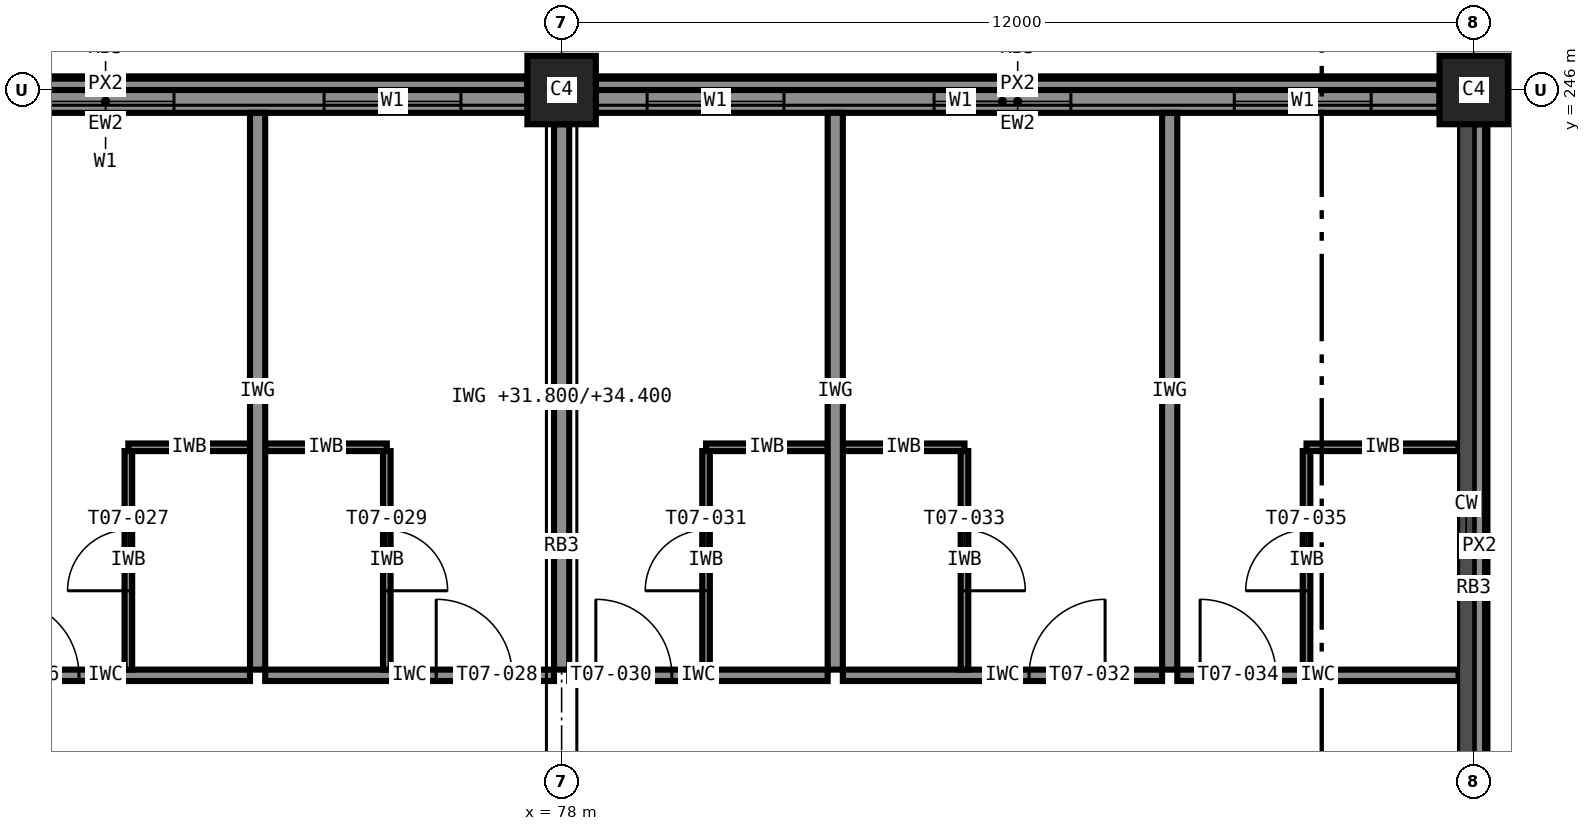
"""IFC4 building model, lengths in metres.
Left out: names, types, materials, properties, quantities, classifications, styles, units other than length and angle.
Written with IfcOpenShell. Run it as: python <this file> out.ifc"""

import sys

from ifc_helpers import new_model, si_unit, direction, frame, frame_2d, origin, origin_2d, place, context, subcontext, project, spatial, rectangle, extrude, element, fill, save


model = new_model("IFC4")
c1 = context("Model", 3, precision=1e-05, world=origin(), true_north=direction((0.0, 1.0)))
c2 = subcontext(c1, "Body", "Model", "MODEL_VIEW")
j1 = project(units=[si_unit("LENGTHUNIT", "METRE"), si_unit("PLANEANGLEUNIT", "RADIAN")], contexts=[c1])
p1 = place(None, origin())
s1 = spatial("IfcSite", under=j1, at=p1, CompositionType="ELEMENT")
p2 = place(p1, origin())
s2 = spatial("IfcBuilding", under=s1, at=p2, CompositionType="ELEMENT")
p3 = place(p2, frame((0.0, 0.0, 31.8)))
s3 = spatial("IfcBuildingStorey", under=s2, at=p3, CompositionType="ELEMENT", Elevation=31.8)
for number, where, z_axis, x_axis in (
    (1, (78.0, 246.0, 0.0), (0.0, 0.0, 1.0), (1.0, 0.0, 0.0)),
    (2, (90.0, 246.0, 0.0), (0.0, 0.0, 1.0), (1.0, 0.0, 0.0)),
):
    element("IfcColumn", number, at=place(p3, frame(where, z_axis=z_axis, x_axis=x_axis)), inside=s3, PredefinedType="COLUMN", context=c2, shape_type="SweptSolid", body=[
        extrude(rectangle(XDim=0.9, YDim=0.9, at=origin_2d()), origin(), (0.0, 0.0, 1.0), 3.6),
    ])
p4 = place(p3, frame((90.075, 234.45, 3.4), z_axis=(0.0, 0.0, 1.0), x_axis=(0.0, 1.0, 0.0)))
e3 = element("IfcWall", 3, at=p4, inside=s3, PredefinedType="STANDARD", context=c2, shape_type="SweptSolid", body=[
    extrude(rectangle(XDim=11.1, YDim=0.15, at=frame_2d((5.55, 0.0))), origin(), (0.0, 0.0, 1.0), 0.2),
])
p5 = place(p3, frame((89.55, 245.85, 0.0), z_axis=(0.0, 0.0, 1.0), x_axis=(-1.0, 0.0, 0.0)))
e4 = element("IfcWall", 4, at=p5, inside=s3, PredefinedType="STANDARD", context=c2, shape_type="SweptSolid", body=[
    extrude(rectangle(XDim=11.1, YDim=0.3, at=frame_2d((5.55, 0.0))), origin(), (0.0, 0.0, 1.0), 2.6),
])
p6 = place(p5, frame((8.625, 0.0, 0.85)))
e5 = element("IfcOpeningElement", 5, at=p6, cuts=e4, PredefinedType="OPENING", context=c2, shape_type="SweptSolid", body=[
    extrude(rectangle(XDim=1.8, YDim=1.75, at=frame_2d((0.9, 0.875))), frame((0.0, 0.16, 0.0), z_axis=(0.0, -1.0, 0.0), x_axis=(1.0, 0.0, 0.0)), (0.0, 0.0, 1.0), 0.32),
])
p7 = place(p5, frame((4.85, 0.0, 0.85)))
e6 = element("IfcOpeningElement", 6, at=p7, cuts=e4, PredefinedType="OPENING", context=c2, shape_type="SweptSolid", body=[
    extrude(rectangle(XDim=1.8, YDim=1.75, at=frame_2d((0.9, 0.875))), frame((0.0, 0.16, 0.0), z_axis=(0.0, -1.0, 0.0), x_axis=(1.0, 0.0, 0.0)), (0.0, 0.0, 1.0), 0.32),
])
p8 = place(p5, frame((0.9, 0.0, 0.85)))
e7 = element("IfcOpeningElement", 7, at=p8, cuts=e4, PredefinedType="OPENING", context=c2, shape_type="SweptSolid", body=[
    extrude(rectangle(XDim=1.8, YDim=1.75, at=frame_2d((0.9, 0.875))), frame((0.0, 0.16, 0.0), z_axis=(0.0, -1.0, 0.0), x_axis=(1.0, 0.0, 0.0)), (0.0, 0.0, 1.0), 0.32),
])
p9 = place(p3, frame((77.55, 245.85, 0.0), z_axis=(0.0, 0.0, 1.0), x_axis=(-1.0, 0.0, 0.0)))
e8 = element("IfcWall", 8, at=p9, inside=s3, PredefinedType="STANDARD", context=c2, shape_type="SweptSolid", body=[
    extrude(rectangle(XDim=11.1, YDim=0.3, at=frame_2d((5.55, 0.0))), origin(), (0.0, 0.0, 1.0), 2.6),
])
p10 = place(p9, frame((8.425, 0.0, 0.85)))
e9 = element("IfcOpeningElement", 9, at=p10, cuts=e8, PredefinedType="OPENING", context=c2, shape_type="SweptSolid", body=[
    extrude(rectangle(XDim=1.8, YDim=1.75, at=frame_2d((0.9, 0.875))), frame((0.0, 0.16, 0.0), z_axis=(0.0, -1.0, 0.0), x_axis=(1.0, 0.0, 0.0)), (0.0, 0.0, 1.0), 0.32),
])
p11 = place(p9, frame((4.65, 0.0, 0.85)))
e10 = element("IfcOpeningElement", 10, at=p11, cuts=e8, PredefinedType="OPENING", context=c2, shape_type="SweptSolid", body=[
    extrude(rectangle(XDim=1.8, YDim=1.75, at=frame_2d((0.9, 0.875))), frame((0.0, 0.16, 0.0), z_axis=(0.0, -1.0, 0.0), x_axis=(1.0, 0.0, 0.0)), (0.0, 0.0, 1.0), 0.32),
])
p12 = place(p9, frame((0.875, 0.0, 0.85)))
e11 = element("IfcOpeningElement", 11, at=p12, cuts=e8, PredefinedType="OPENING", context=c2, shape_type="SweptSolid", body=[
    extrude(rectangle(XDim=1.8, YDim=1.75, at=frame_2d((0.9, 0.875))), frame((0.0, 0.16, 0.0), z_axis=(0.0, -1.0, 0.0), x_axis=(1.0, 0.0, 0.0)), (0.0, 0.0, 1.0), 0.32),
])
for number, where, z_axis, x_axis in (
    (12, (89.55, 246.075, 3.4), (0.0, 0.0, 1.0), (-1.0, 0.0, 0.0)),
    (13, (77.55, 246.075, 3.4), (0.0, 0.0, 1.0), (-1.0, 0.0, 0.0)),
):
    element("IfcWall", number, at=place(p3, frame(where, z_axis=z_axis, x_axis=x_axis)), inside=s3, PredefinedType="STANDARD", context=c2, shape_type="SweptSolid", body=[
        extrude(rectangle(XDim=11.1, YDim=0.15, at=frame_2d((5.55, 0.0))), origin(), (0.0, 0.0, 1.0), 0.2),
    ])
p13 = place(p3, frame((70.1, 238.3, 0.0), z_axis=(0.0, 0.0, 1.0), x_axis=(1.0, 0.0, 0.0)))
e14 = element("IfcWall", 14, at=p13, inside=s3, PredefinedType="PARTITIONING", context=c2, shape_type="SweptSolid", body=[
    extrude(rectangle(XDim=3.8, YDim=0.15, at=frame_2d((1.9, 0.0))), origin(), (0.0, 0.0, 1.0), 3.4),
])
p14 = place(p13, frame((0.55, 0.0, 0.0)))
e15 = element("IfcOpeningElement", 15, at=p14, cuts=e14, PredefinedType="OPENING", context=c2, shape_type="SweptSolid", body=[
    extrude(rectangle(XDim=1.0, YDim=2.1, at=frame_2d((0.5, 1.05))), frame((0.0, 0.085, 0.0), z_axis=(0.0, -1.0, 0.0), x_axis=(1.0, 0.0, 0.0)), (0.0, 0.0, 1.0), 0.17),
])
p15 = place(p3, frame((72.3, 241.3, 0.0), z_axis=(0.0, 0.0, 1.0), x_axis=(1.0, 0.0, 0.0)))
e16 = element("IfcWall", 16, at=p15, inside=s3, PredefinedType="PARTITIONING", context=c2, shape_type="SweptSolid", body=[
    extrude(rectangle(XDim=1.6, YDim=0.1, at=frame_2d((0.8, 0.0))), origin(), (0.0, 0.0, 1.0), 3.4),
])
p16 = place(p3, frame((72.3, 238.375, 0.0), z_axis=(0.0, 0.0, 1.0), x_axis=(0.0, 1.0, 0.0)))
e17 = element("IfcWall", 17, at=p16, inside=s3, PredefinedType="PARTITIONING", context=c2, shape_type="SweptSolid", body=[
    extrude(rectangle(XDim=2.875, YDim=0.1, at=frame_2d((1.438, 0.0))), origin(), (0.0, 0.0, 1.0), 3.4),
])
p17 = place(p16, frame((1.038, 0.0, 0.0)))
e18 = element("IfcOpeningElement", 18, at=p17, cuts=e17, PredefinedType="OPENING", context=c2, shape_type="SweptSolid", body=[
    extrude(rectangle(XDim=0.8, YDim=2.1, at=frame_2d((0.4, 1.05))), frame((0.0, 0.06, 0.0), z_axis=(0.0, -1.0, 0.0), x_axis=(1.0, 0.0, 0.0)), (0.0, 0.0, 1.0), 0.12),
])
p18 = place(p3, frame((74.1, 238.3, 0.0), z_axis=(0.0, 0.0, 1.0), x_axis=(1.0, 0.0, 0.0)))
e19 = element("IfcWall", 19, at=p18, inside=s3, PredefinedType="PARTITIONING", context=c2, shape_type="SweptSolid", body=[
    extrude(rectangle(XDim=3.8, YDim=0.15, at=frame_2d((1.9, 0.0))), origin(), (0.0, 0.0, 1.0), 3.4),
])
p19 = place(p18, frame((2.25, 0.0, 0.0)))
e20 = element("IfcOpeningElement", 20, at=p19, cuts=e19, PredefinedType="OPENING", context=c2, shape_type="SweptSolid", body=[
    extrude(rectangle(XDim=1.0, YDim=2.1, at=frame_2d((0.5, 1.05))), frame((0.0, 0.085, 0.0), z_axis=(0.0, -1.0, 0.0), x_axis=(1.0, 0.0, 0.0)), (0.0, 0.0, 1.0), 0.17),
])
p20 = place(p3, frame((74.1, 241.3, 0.0), z_axis=(0.0, 0.0, 1.0), x_axis=(1.0, 0.0, 0.0)))
e21 = element("IfcWall", 21, at=p20, inside=s3, PredefinedType="PARTITIONING", context=c2, shape_type="SweptSolid", body=[
    extrude(rectangle(XDim=1.6, YDim=0.1, at=frame_2d((0.8, 0.0))), origin(), (0.0, 0.0, 1.0), 3.4),
])
p21 = place(p3, frame((75.7, 241.25, 0.0), z_axis=(0.0, 0.0, 1.0), x_axis=(0.0, -1.0, 0.0)))
e22 = element("IfcWall", 22, at=p21, inside=s3, PredefinedType="PARTITIONING", context=c2, shape_type="SweptSolid", body=[
    extrude(rectangle(XDim=2.875, YDim=0.1, at=frame_2d((1.438, 0.0))), origin(), (0.0, 0.0, 1.0), 3.4),
])
p22 = place(p21, frame((1.038, 0.0, 0.0)))
e23 = element("IfcOpeningElement", 23, at=p22, cuts=e22, PredefinedType="OPENING", context=c2, shape_type="SweptSolid", body=[
    extrude(rectangle(XDim=0.8, YDim=2.1, at=frame_2d((0.4, 1.05))), frame((0.0, 0.06, 0.0), z_axis=(0.0, -1.0, 0.0), x_axis=(1.0, 0.0, 0.0)), (0.0, 0.0, 1.0), 0.12),
])
p23 = place(p3, frame((78.1, 238.3, 0.0), z_axis=(0.0, 0.0, 1.0), x_axis=(1.0, 0.0, 0.0)))
e24 = element("IfcWall", 24, at=p23, inside=s3, PredefinedType="PARTITIONING", context=c2, shape_type="SweptSolid", body=[
    extrude(rectangle(XDim=3.4, YDim=0.15, at=frame_2d((1.7, 0.0))), origin(), (0.0, 0.0, 1.0), 3.4),
])
p24 = place(p23, frame((0.35, 0.0, 0.0)))
e25 = element("IfcOpeningElement", 25, at=p24, cuts=e24, PredefinedType="OPENING", context=c2, shape_type="SweptSolid", body=[
    extrude(rectangle(XDim=1.0, YDim=2.1, at=frame_2d((0.5, 1.05))), frame((0.0, 0.085, 0.0), z_axis=(0.0, -1.0, 0.0), x_axis=(1.0, 0.0, 0.0)), (0.0, 0.0, 1.0), 0.17),
])
p25 = place(p3, frame((79.9, 241.3, 0.0), z_axis=(0.0, 0.0, 1.0), x_axis=(1.0, 0.0, 0.0)))
e26 = element("IfcWall", 26, at=p25, inside=s3, PredefinedType="PARTITIONING", context=c2, shape_type="SweptSolid", body=[
    extrude(rectangle(XDim=1.6, YDim=0.1, at=frame_2d((0.8, 0.0))), origin(), (0.0, 0.0, 1.0), 3.4),
])
p26 = place(p3, frame((79.9, 238.375, 0.0), z_axis=(0.0, 0.0, 1.0), x_axis=(0.0, 1.0, 0.0)))
e27 = element("IfcWall", 27, at=p26, inside=s3, PredefinedType="PARTITIONING", context=c2, shape_type="SweptSolid", body=[
    extrude(rectangle(XDim=2.875, YDim=0.1, at=frame_2d((1.438, 0.0))), origin(), (0.0, 0.0, 1.0), 3.4),
])
p27 = place(p26, frame((1.038, 0.0, 0.0)))
e28 = element("IfcOpeningElement", 28, at=p27, cuts=e27, PredefinedType="OPENING", context=c2, shape_type="SweptSolid", body=[
    extrude(rectangle(XDim=0.8, YDim=2.1, at=frame_2d((0.4, 1.05))), frame((0.0, 0.06, 0.0), z_axis=(0.0, -1.0, 0.0), x_axis=(1.0, 0.0, 0.0)), (0.0, 0.0, 1.0), 0.12),
])
p28 = place(p3, frame((81.7, 238.3, 0.0), z_axis=(0.0, 0.0, 1.0), x_axis=(1.0, 0.0, 0.0)))
e29 = element("IfcWall", 29, at=p28, inside=s3, PredefinedType="PARTITIONING", context=c2, shape_type="SweptSolid", body=[
    extrude(rectangle(XDim=4.2, YDim=0.15, at=frame_2d((2.1, 0.0))), origin(), (0.0, 0.0, 1.0), 3.4),
])
p29 = place(p28, frame((2.45, 0.0, 0.0)))
e30 = element("IfcOpeningElement", 30, at=p29, cuts=e29, PredefinedType="OPENING", context=c2, shape_type="SweptSolid", body=[
    extrude(rectangle(XDim=1.0, YDim=2.1, at=frame_2d((0.5, 1.05))), frame((0.0, 0.085, 0.0), z_axis=(0.0, -1.0, 0.0), x_axis=(1.0, 0.0, 0.0)), (0.0, 0.0, 1.0), 0.17),
])
p30 = place(p3, frame((81.7, 241.3, 0.0), z_axis=(0.0, 0.0, 1.0), x_axis=(1.0, 0.0, 0.0)))
e31 = element("IfcWall", 31, at=p30, inside=s3, PredefinedType="PARTITIONING", context=c2, shape_type="SweptSolid", body=[
    extrude(rectangle(XDim=1.6, YDim=0.1, at=frame_2d((0.8, 0.0))), origin(), (0.0, 0.0, 1.0), 3.4),
])
p31 = place(p3, frame((83.3, 241.25, 0.0), z_axis=(0.0, 0.0, 1.0), x_axis=(0.0, -1.0, 0.0)))
e32 = element("IfcWall", 32, at=p31, inside=s3, PredefinedType="PARTITIONING", context=c2, shape_type="SweptSolid", body=[
    extrude(rectangle(XDim=2.875, YDim=0.1, at=frame_2d((1.438, 0.0))), origin(), (0.0, 0.0, 1.0), 3.4),
])
p32 = place(p31, frame((1.038, 0.0, 0.0)))
e33 = element("IfcOpeningElement", 33, at=p32, cuts=e32, PredefinedType="OPENING", context=c2, shape_type="SweptSolid", body=[
    extrude(rectangle(XDim=0.8, YDim=2.1, at=frame_2d((0.4, 1.05))), frame((0.0, 0.06, 0.0), z_axis=(0.0, -1.0, 0.0), x_axis=(1.0, 0.0, 0.0)), (0.0, 0.0, 1.0), 0.12),
])
p33 = place(p3, frame((86.1, 238.3, 0.0), z_axis=(0.0, 0.0, 1.0), x_axis=(1.0, 0.0, 0.0)))
e34 = element("IfcWall", 34, at=p33, inside=s3, PredefinedType="PARTITIONING", context=c2, shape_type="SweptSolid", body=[
    extrude(rectangle(XDim=3.7, YDim=0.15, at=frame_2d((1.85, 0.0))), origin(), (0.0, 0.0, 1.0), 3.4),
])
p34 = place(p33, frame((0.3, 0.0, 0.0)))
e35 = element("IfcOpeningElement", 35, at=p34, cuts=e34, PredefinedType="OPENING", context=c2, shape_type="SweptSolid", body=[
    extrude(rectangle(XDim=1.0, YDim=2.1, at=frame_2d((0.5, 1.05))), frame((0.0, 0.085, 0.0), z_axis=(0.0, -1.0, 0.0), x_axis=(1.0, 0.0, 0.0)), (0.0, 0.0, 1.0), 0.17),
])
p35 = place(p3, frame((87.8, 241.3, 0.0), z_axis=(0.0, 0.0, 1.0), x_axis=(1.0, 0.0, 0.0)))
e36 = element("IfcWall", 36, at=p35, inside=s3, PredefinedType="PARTITIONING", context=c2, shape_type="SweptSolid", body=[
    extrude(rectangle(XDim=2.0, YDim=0.1, at=frame_2d((1.0, 0.0))), origin(), (0.0, 0.0, 1.0), 3.4),
])
p36 = place(p3, frame((87.8, 238.375, 0.0), z_axis=(0.0, 0.0, 1.0), x_axis=(0.0, 1.0, 0.0)))
e37 = element("IfcWall", 37, at=p36, inside=s3, PredefinedType="PARTITIONING", context=c2, shape_type="SweptSolid", body=[
    extrude(rectangle(XDim=2.875, YDim=0.1, at=frame_2d((1.438, 0.0))), origin(), (0.0, 0.0, 1.0), 3.4),
])
p37 = place(p36, frame((1.038, 0.0, 0.0)))
e38 = element("IfcOpeningElement", 38, at=p37, cuts=e37, PredefinedType="OPENING", context=c2, shape_type="SweptSolid", body=[
    extrude(rectangle(XDim=0.8, YDim=2.1, at=frame_2d((0.4, 1.05))), frame((0.0, 0.06, 0.0), z_axis=(0.0, -1.0, 0.0), x_axis=(1.0, 0.0, 0.0)), (0.0, 0.0, 1.0), 0.12),
])
p38 = place(p3, frame((74.0, 245.7, 0.0), z_axis=(0.0, 0.0, 1.0), x_axis=(0.0, -1.0, 0.0)))
e39 = element("IfcWall", 39, at=p38, inside=s3, PredefinedType="PARTITIONING", context=c2, shape_type="SweptSolid", body=[
    extrude(rectangle(XDim=7.325, YDim=0.2, at=frame_2d((3.663, 0.0))), origin(), (0.0, 0.0, 1.0), 3.4),
])
p39 = place(p3, frame((78.0, 245.55, 0.0), z_axis=(0.0, 0.0, 1.0), x_axis=(0.0, -1.0, 0.0)))
e40 = element("IfcWall", 40, at=p39, inside=s3, PredefinedType="PARTITIONING", context=c2, shape_type="SweptSolid", body=[
    extrude(rectangle(XDim=7.175, YDim=0.2, at=frame_2d((3.587, 0.0))), origin(), (0.0, 0.0, 1.0), 2.6),
])
for number, where, z_axis, x_axis in (
    (41, (81.6, 245.7, 0.0), (0.0, 0.0, 1.0), (0.0, -1.0, 0.0)),
    (42, (86.0, 245.7, 0.0), (0.0, 0.0, 1.0), (0.0, -1.0, 0.0)),
):
    element("IfcWall", number, at=place(p3, frame(where, z_axis=z_axis, x_axis=x_axis)), inside=s3, PredefinedType="PARTITIONING", context=c2, shape_type="SweptSolid", body=[
        extrude(rectangle(XDim=7.325, YDim=0.2, at=frame_2d((3.663, 0.0))), origin(), (0.0, 0.0, 1.0), 3.4),
    ])
p40 = place(p6, origin())
e43 = element("IfcWindow", 43, at=p40, inside=s3, PartitioningType="SINGLE_PANEL", PredefinedType="WINDOW", context=c2, shape_type="SweptSolid", body=[
    extrude(rectangle(XDim=1.8, YDim=1.75, at=frame_2d((0.9, 0.875))), frame((0.0, 0.03, 0.0), z_axis=(0.0, -1.0, 0.0), x_axis=(1.0, 0.0, 0.0)), (0.0, 0.0, 1.0), 0.06),
])
fill(e5, e43)
p41 = place(p7, origin())
e44 = element("IfcWindow", 44, at=p41, inside=s3, PartitioningType="SINGLE_PANEL", PredefinedType="WINDOW", context=c2, shape_type="SweptSolid", body=[
    extrude(rectangle(XDim=1.8, YDim=1.75, at=frame_2d((0.9, 0.875))), frame((0.0, 0.03, 0.0), z_axis=(0.0, -1.0, 0.0), x_axis=(1.0, 0.0, 0.0)), (0.0, 0.0, 1.0), 0.06),
])
fill(e6, e44)
p42 = place(p8, origin())
e45 = element("IfcWindow", 45, at=p42, inside=s3, PartitioningType="SINGLE_PANEL", PredefinedType="WINDOW", context=c2, shape_type="SweptSolid", body=[
    extrude(rectangle(XDim=1.8, YDim=1.75, at=frame_2d((0.9, 0.875))), frame((0.0, 0.03, 0.0), z_axis=(0.0, -1.0, 0.0), x_axis=(1.0, 0.0, 0.0)), (0.0, 0.0, 1.0), 0.06),
])
fill(e7, e45)
p43 = place(p11, origin())
e46 = element("IfcWindow", 46, at=p43, inside=s3, PartitioningType="SINGLE_PANEL", PredefinedType="WINDOW", context=c2, shape_type="SweptSolid", body=[
    extrude(rectangle(XDim=1.8, YDim=1.75, at=frame_2d((0.9, 0.875))), frame((0.0, 0.03, 0.0), z_axis=(0.0, -1.0, 0.0), x_axis=(1.0, 0.0, 0.0)), (0.0, 0.0, 1.0), 0.06),
])
fill(e10, e46)
p44 = place(p12, origin())
e47 = element("IfcWindow", 47, at=p44, inside=s3, PartitioningType="SINGLE_PANEL", PredefinedType="WINDOW", context=c2, shape_type="SweptSolid", body=[
    extrude(rectangle(XDim=1.8, YDim=1.75, at=frame_2d((0.9, 0.875))), frame((0.0, 0.03, 0.0), z_axis=(0.0, -1.0, 0.0), x_axis=(1.0, 0.0, 0.0)), (0.0, 0.0, 1.0), 0.06),
])
fill(e11, e47)
p45 = place(p14, origin())
e48 = element("IfcDoor", 48, at=p45, inside=s3, OperationType="SINGLE_SWING_LEFT", PredefinedType="DOOR", context=c2, shape_type="SweptSolid", body=[
    extrude(rectangle(XDim=1.0, YDim=2.1, at=frame_2d((0.5, 1.05))), frame((0.0, 0.025, 0.0), z_axis=(0.0, -1.0, 0.0), x_axis=(1.0, 0.0, 0.0)), (0.0, 0.0, 1.0), 0.05),
])
fill(e15, e48)
p46 = place(p17, origin())
e49 = element("IfcDoor", 49, at=p46, inside=s3, OperationType="SINGLE_SWING_LEFT", PredefinedType="DOOR", context=c2, shape_type="SweptSolid", body=[
    extrude(rectangle(XDim=0.8, YDim=2.1, at=frame_2d((0.4, 1.05))), frame((0.0, 0.025, 0.0), z_axis=(0.0, -1.0, 0.0), x_axis=(1.0, 0.0, 0.0)), (0.0, 0.0, 1.0), 0.05),
])
fill(e18, e49)
p47 = place(p19, origin())
e50 = element("IfcDoor", 50, at=p47, inside=s3, OperationType="SINGLE_SWING_LEFT", PredefinedType="DOOR", context=c2, shape_type="SweptSolid", body=[
    extrude(rectangle(XDim=1.0, YDim=2.1, at=frame_2d((0.5, 1.05))), frame((0.0, 0.025, 0.0), z_axis=(0.0, -1.0, 0.0), x_axis=(1.0, 0.0, 0.0)), (0.0, 0.0, 1.0), 0.05),
])
fill(e20, e50)
p48 = place(p22, origin())
e51 = element("IfcDoor", 51, at=p48, inside=s3, OperationType="SINGLE_SWING_RIGHT", PredefinedType="DOOR", context=c2, shape_type="SweptSolid", body=[
    extrude(rectangle(XDim=0.8, YDim=2.1, at=frame_2d((0.4, 1.05))), frame((0.0, 0.025, 0.0), z_axis=(0.0, -1.0, 0.0), x_axis=(1.0, 0.0, 0.0)), (0.0, 0.0, 1.0), 0.05),
])
fill(e23, e51)
p49 = place(p24, origin())
e52 = element("IfcDoor", 52, at=p49, inside=s3, OperationType="SINGLE_SWING_LEFT", PredefinedType="DOOR", context=c2, shape_type="SweptSolid", body=[
    extrude(rectangle(XDim=1.0, YDim=2.1, at=frame_2d((0.5, 1.05))), frame((0.0, 0.025, 0.0), z_axis=(0.0, -1.0, 0.0), x_axis=(1.0, 0.0, 0.0)), (0.0, 0.0, 1.0), 0.05),
])
fill(e25, e52)
p50 = place(p27, origin())
e53 = element("IfcDoor", 53, at=p50, inside=s3, OperationType="SINGLE_SWING_LEFT", PredefinedType="DOOR", context=c2, shape_type="SweptSolid", body=[
    extrude(rectangle(XDim=0.8, YDim=2.1, at=frame_2d((0.4, 1.05))), frame((0.0, 0.025, 0.0), z_axis=(0.0, -1.0, 0.0), x_axis=(1.0, 0.0, 0.0)), (0.0, 0.0, 1.0), 0.05),
])
fill(e28, e53)
p51 = place(p29, origin())
e54 = element("IfcDoor", 54, at=p51, inside=s3, OperationType="SINGLE_SWING_RIGHT", PredefinedType="DOOR", context=c2, shape_type="SweptSolid", body=[
    extrude(rectangle(XDim=1.0, YDim=2.1, at=frame_2d((0.5, 1.05))), frame((0.0, 0.025, 0.0), z_axis=(0.0, -1.0, 0.0), x_axis=(1.0, 0.0, 0.0)), (0.0, 0.0, 1.0), 0.05),
])
fill(e30, e54)
p52 = place(p32, origin())
e55 = element("IfcDoor", 55, at=p52, inside=s3, OperationType="SINGLE_SWING_RIGHT", PredefinedType="DOOR", context=c2, shape_type="SweptSolid", body=[
    extrude(rectangle(XDim=0.8, YDim=2.1, at=frame_2d((0.4, 1.05))), frame((0.0, 0.025, 0.0), z_axis=(0.0, -1.0, 0.0), x_axis=(1.0, 0.0, 0.0)), (0.0, 0.0, 1.0), 0.05),
])
fill(e33, e55)
p53 = place(p34, origin())
e56 = element("IfcDoor", 56, at=p53, inside=s3, OperationType="SINGLE_SWING_LEFT", PredefinedType="DOOR", context=c2, shape_type="SweptSolid", body=[
    extrude(rectangle(XDim=1.0, YDim=2.1, at=frame_2d((0.5, 1.05))), frame((0.0, 0.025, 0.0), z_axis=(0.0, -1.0, 0.0), x_axis=(1.0, 0.0, 0.0)), (0.0, 0.0, 1.0), 0.05),
])
fill(e35, e56)
p54 = place(p37, origin())
e57 = element("IfcDoor", 57, at=p54, inside=s3, OperationType="SINGLE_SWING_LEFT", PredefinedType="DOOR", context=c2, shape_type="SweptSolid", body=[
    extrude(rectangle(XDim=0.8, YDim=2.1, at=frame_2d((0.4, 1.05))), frame((0.0, 0.025, 0.0), z_axis=(0.0, -1.0, 0.0), x_axis=(1.0, 0.0, 0.0)), (0.0, 0.0, 1.0), 0.05),
])
fill(e38, e57)
save(model, sys.argv[1])
